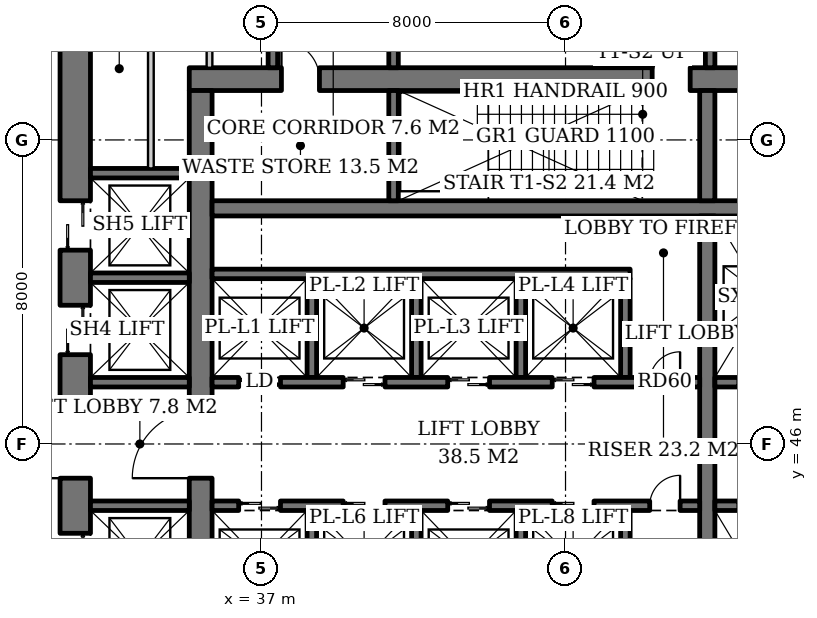
"""IFC4 building model, lengths in metres.
Left out: names, types, materials, properties, quantities, classifications, styles, units other than length and angle.
Written with IfcOpenShell. Run it as: python <this file> out.ifc"""

import sys

from ifc_helpers import new_model, si_unit, direction, frame, frame_2d, origin, place, context, subcontext, project, spatial, rectangle, extrude, element, fill, save


model = new_model("IFC4")
c1 = context("Model", 3, precision=1e-05, world=origin(), true_north=direction((0.0, 1.0)))
c2 = subcontext(c1, "Body", "Model", "MODEL_VIEW")
j1 = project(units=[si_unit("LENGTHUNIT", "METRE"), si_unit("PLANEANGLEUNIT", "RADIAN")], contexts=[c1])
p1 = place(None, origin())
s1 = spatial("IfcSite", under=j1, at=p1, CompositionType="ELEMENT")
p2 = place(p1, origin())
s2 = spatial("IfcBuilding", under=s1, at=p2, CompositionType="ELEMENT")
p3 = place(p2, frame((0.0, 0.0, 6.0)))
s3 = spatial("IfcBuildingStorey", under=s2, at=p3, CompositionType="ELEMENT", Elevation=6.0)
p4 = place(p3, frame((35.1, 55.6, 0.0), z_axis=(0.0, 0.0, 1.0), x_axis=(1.0, 0.0, 0.0)))
e1 = element("IfcWall", 1, at=p4, inside=s3, PredefinedType="SHEAR", context=c2, shape_type="SweptSolid", body=[
    extrude(rectangle(XDim=19.8, YDim=0.6, at=frame_2d((9.9, 0.0))), origin(), (0.0, 0.0, 1.0), 5.0),
])
p5 = place(p4, frame((14.54, 0.0, 0.0)))
e2 = element("IfcOpeningElement", 2, at=p5, cuts=e1, PredefinedType="OPENING", context=c2, shape_type="SweptSolid", body=[
    extrude(rectangle(XDim=1.0, YDim=2.1, at=frame_2d((0.5, 1.05))), frame((0.0, 0.31, 0.0), z_axis=(0.0, -1.0, 0.0), x_axis=(1.0, 0.0, 0.0)), (0.0, 0.0, 1.0), 0.62),
])
p6 = place(p4, frame((12.18, 0.0, 0.0)))
e3 = element("IfcOpeningElement", 3, at=p6, cuts=e1, PredefinedType="OPENING", context=c2, shape_type="SweptSolid", body=[
    extrude(rectangle(XDim=1.0, YDim=2.1, at=frame_2d((0.5, 1.05))), frame((0.0, 0.31, 0.0), z_axis=(0.0, -1.0, 0.0), x_axis=(1.0, 0.0, 0.0)), (0.0, 0.0, 1.0), 0.62),
])
p7 = place(p4, frame((2.425, 0.0, 0.0)))
e4 = element("IfcOpeningElement", 4, at=p7, cuts=e1, PredefinedType="OPENING", context=c2, shape_type="SweptSolid", body=[
    extrude(rectangle(XDim=1.0, YDim=2.1, at=frame_2d((0.5, 1.05))), frame((0.0, 0.31, 0.0), z_axis=(0.0, -1.0, 0.0), x_axis=(1.0, 0.0, 0.0)), (0.0, 0.0, 1.0), 0.62),
])
p8 = place(p3, frame((35.4, 36.7, 0.0), z_axis=(0.0, 0.0, 1.0), x_axis=(0.0, 1.0, 0.0)))
e5 = element("IfcWall", 5, at=p8, inside=s3, PredefinedType="SHEAR", context=c2, shape_type="SweptSolid", body=[
    extrude(rectangle(XDim=18.6, YDim=0.6, at=frame_2d((9.3, 0.0))), origin(), (0.0, 0.0, 1.0), 5.0),
])
p9 = place(p8, frame((8.4, 0.0, 0.0)))
e6 = element("IfcOpeningElement", 6, at=p9, cuts=e5, PredefinedType="OPENING", context=c2, shape_type="SweptSolid", body=[
    extrude(rectangle(XDim=1.8, YDim=2.4, at=frame_2d((0.9, 1.2))), frame((0.0, 0.31, 0.0), z_axis=(0.0, -1.0, 0.0), x_axis=(1.0, 0.0, 0.0)), (0.0, 0.0, 1.0), 0.62),
])
p10 = place(p3, frame((32.1, 33.5, 0.0), z_axis=(0.0, 0.0, 1.0), x_axis=(0.0, 1.0, 0.0)))
e7 = element("IfcWall", 7, at=p10, inside=s3, PredefinedType="SHEAR", context=c2, shape_type="SweptSolid", body=[
    extrude(rectangle(XDim=25.0, YDim=0.8, at=frame_2d((12.5, 0.0))), origin(), (0.0, 0.0, 1.0), 5.0),
])
p11 = place(p10, frame((3.35, 0.0, 0.0)))
e8 = element("IfcOpeningElement", 8, at=p11, cuts=e7, PredefinedType="OPENING", context=c2, shape_type="SweptSolid", body=[
    extrude(rectangle(XDim=1.3, YDim=2.2, at=frame_2d((0.65, 1.1))), frame((0.0, 0.41, 0.0), z_axis=(0.0, -1.0, 0.0), x_axis=(1.0, 0.0, 0.0)), (0.0, 0.0, 1.0), 0.82),
])
p12 = place(p10, frame((6.1, 0.0, 0.0)))
e9 = element("IfcOpeningElement", 9, at=p12, cuts=e7, PredefinedType="OPENING", context=c2, shape_type="SweptSolid", body=[
    extrude(rectangle(XDim=1.3, YDim=2.2, at=frame_2d((0.65, 1.1))), frame((0.0, 0.41, 0.0), z_axis=(0.0, -1.0, 0.0), x_axis=(1.0, 0.0, 0.0)), (0.0, 0.0, 1.0), 0.82),
])
p13 = place(p10, frame((8.85, 0.0, 0.0)))
e10 = element("IfcOpeningElement", 10, at=p13, cuts=e7, PredefinedType="OPENING", context=c2, shape_type="SweptSolid", body=[
    extrude(rectangle(XDim=1.3, YDim=2.2, at=frame_2d((0.65, 1.1))), frame((0.0, 0.41, 0.0), z_axis=(0.0, -1.0, 0.0), x_axis=(1.0, 0.0, 0.0)), (0.0, 0.0, 1.0), 0.82),
])
p14 = place(p10, frame((14.85, 0.0, 0.0)))
e11 = element("IfcOpeningElement", 11, at=p14, cuts=e7, PredefinedType="OPENING", context=c2, shape_type="SweptSolid", body=[
    extrude(rectangle(XDim=1.3, YDim=2.2, at=frame_2d((0.65, 1.1))), frame((0.0, 0.41, 0.0), z_axis=(0.0, -1.0, 0.0), x_axis=(1.0, 0.0, 0.0)), (0.0, 0.0, 1.0), 0.82),
])
p15 = place(p10, frame((17.6, 0.0, 0.0)))
e12 = element("IfcOpeningElement", 12, at=p15, cuts=e7, PredefinedType="OPENING", context=c2, shape_type="SweptSolid", body=[
    extrude(rectangle(XDim=1.3, YDim=2.2, at=frame_2d((0.65, 1.1))), frame((0.0, 0.41, 0.0), z_axis=(0.0, -1.0, 0.0), x_axis=(1.0, 0.0, 0.0)), (0.0, 0.0, 1.0), 0.82),
])
p16 = place(p10, frame((11.6, 0.0, 0.0)))
e13 = element("IfcOpeningElement", 13, at=p16, cuts=e7, PredefinedType="OPENING", context=c2, shape_type="SweptSolid", body=[
    extrude(rectangle(XDim=1.8, YDim=2.4, at=frame_2d((0.9, 1.2))), frame((0.0, 0.41, 0.0), z_axis=(0.0, -1.0, 0.0), x_axis=(1.0, 0.0, 0.0)), (0.0, 0.0, 1.0), 0.82),
])
p17 = place(p3, frame((35.7, 52.2, 0.0), z_axis=(0.0, 0.0, 1.0), x_axis=(1.0, 0.0, 0.0)))
e14 = element("IfcWall", 14, at=p17, inside=s3, PredefinedType="SHEAR", context=c2, shape_type="SweptSolid", body=[
    extrude(rectangle(XDim=18.6, YDim=0.4, at=frame_2d((9.3, 0.0))), origin(), (0.0, 0.0, 1.0), 5.0),
])
p18 = place(p3, frame((48.73, 40.0, 0.0), z_axis=(0.0, 0.0, 1.0), x_axis=(0.0, 1.0, 0.0)))
e15 = element("IfcWall", 15, at=p18, inside=s3, PredefinedType="SHEAR", context=c2, shape_type="SweptSolid", body=[
    extrude(rectangle(XDim=12.0, YDim=0.4, at=frame_2d((6.0, 0.0))), origin(), (0.0, 0.0, 1.0), 5.0),
])
p19 = place(p3, frame((48.73, 52.4, 0.0), z_axis=(0.0, 0.0, 1.0), x_axis=(0.0, 1.0, 0.0)))
e16 = element("IfcWall", 16, at=p19, inside=s3, PredefinedType="SHEAR", context=c2, shape_type="SweptSolid", body=[
    extrude(rectangle(XDim=2.9, YDim=0.4, at=frame_2d((1.45, 0.0))), origin(), (0.0, 0.0, 1.0), 5.0),
])
p20 = place(p3, frame((40.475, 52.4, 0.0), z_axis=(0.0, 0.0, 1.0), x_axis=(0.0, 1.0, 0.0)))
e17 = element("IfcWall", 17, at=p20, inside=s3, PredefinedType="SHEAR", context=c2, shape_type="SweptSolid", body=[
    extrude(rectangle(XDim=2.9, YDim=0.25, at=frame_2d((1.45, 0.0))), origin(), (0.0, 0.0, 1.0), 5.0),
])
for number, where, z_axis, x_axis in (
    (18, (38.325, 47.75, 0.0), (0.0, 0.0, 1.0), (0.0, 1.0, 0.0)),
    (19, (41.075, 47.75, 0.0), (0.0, 0.0, 1.0), (0.0, 1.0, 0.0)),
    (20, (43.825, 47.75, 0.0), (0.0, 0.0, 1.0), (0.0, 1.0, 0.0)),
    (21, (46.575, 47.75, 0.0), (0.0, 0.0, 1.0), (0.0, 1.0, 0.0)),
):
    element("IfcWall", number, at=place(p3, frame(where, z_axis=z_axis, x_axis=x_axis)), inside=s3, PredefinedType="SHEAR", context=c2, shape_type="SweptSolid", body=[
        extrude(rectangle(XDim=2.6, YDim=0.25, at=frame_2d((1.3, 0.0))), origin(), (0.0, 0.0, 1.0), 5.0),
    ])
p21 = place(p3, frame((35.7, 50.475, 0.0), z_axis=(0.0, 0.0, 1.0), x_axis=(1.0, 0.0, 0.0)))
e22 = element("IfcWall", 22, at=p21, inside=s3, PredefinedType="SHEAR", context=c2, shape_type="SweptSolid", body=[
    extrude(rectangle(XDim=11.0, YDim=0.25, at=frame_2d((5.5, 0.0))), origin(), (0.0, 0.0, 1.0), 5.0),
])
p22 = place(p3, frame((35.7, 47.625, 0.0), z_axis=(0.0, 0.0, 1.0), x_axis=(1.0, 0.0, 0.0)))
e23 = element("IfcWall", 23, at=p22, inside=s3, PredefinedType="SHEAR", context=c2, shape_type="SweptSolid", body=[
    extrude(rectangle(XDim=12.83, YDim=0.25, at=frame_2d((6.415, 0.0))), origin(), (0.0, 0.0, 1.0), 5.0),
])
p23 = place(p22, frame((0.7, 0.0, 0.0)))
e24 = element("IfcOpeningElement", 24, at=p23, cuts=e23, PredefinedType="OPENING", context=c2, shape_type="SweptSolid", body=[
    extrude(rectangle(XDim=1.1, YDim=2.2, at=frame_2d((0.55, 1.1))), frame((0.0, 0.135, 0.0), z_axis=(0.0, -1.0, 0.0), x_axis=(1.0, 0.0, 0.0)), (0.0, 0.0, 1.0), 0.27),
])
p24 = place(p22, frame((3.45, 0.0, 0.0)))
e25 = element("IfcOpeningElement", 25, at=p24, cuts=e23, PredefinedType="OPENING", context=c2, shape_type="SweptSolid", body=[
    extrude(rectangle(XDim=1.1, YDim=2.2, at=frame_2d((0.55, 1.1))), frame((0.0, 0.135, 0.0), z_axis=(0.0, -1.0, 0.0), x_axis=(1.0, 0.0, 0.0)), (0.0, 0.0, 1.0), 0.27),
])
p25 = place(p22, frame((6.2, 0.0, 0.0)))
e26 = element("IfcOpeningElement", 26, at=p25, cuts=e23, PredefinedType="OPENING", context=c2, shape_type="SweptSolid", body=[
    extrude(rectangle(XDim=1.1, YDim=2.2, at=frame_2d((0.55, 1.1))), frame((0.0, 0.135, 0.0), z_axis=(0.0, -1.0, 0.0), x_axis=(1.0, 0.0, 0.0)), (0.0, 0.0, 1.0), 0.27),
])
p26 = place(p22, frame((8.95, 0.0, 0.0)))
e27 = element("IfcOpeningElement", 27, at=p26, cuts=e23, PredefinedType="OPENING", context=c2, shape_type="SweptSolid", body=[
    extrude(rectangle(XDim=1.1, YDim=2.2, at=frame_2d((0.55, 1.1))), frame((0.0, 0.135, 0.0), z_axis=(0.0, -1.0, 0.0), x_axis=(1.0, 0.0, 0.0)), (0.0, 0.0, 1.0), 0.27),
])
p27 = place(p22, frame((11.515, 0.0, 0.0)))
e28 = element("IfcOpeningElement", 28, at=p27, cuts=e23, PredefinedType="OPENING", context=c2, shape_type="SweptSolid", body=[
    extrude(rectangle(XDim=0.8, YDim=2.0, at=frame_2d((0.4, 1.0))), frame((0.0, 0.135, 0.0), z_axis=(0.0, -1.0, 0.0), x_axis=(1.0, 0.0, 0.0)), (0.0, 0.0, 1.0), 0.27),
])
for number, where, z_axis, x_axis in (
    (29, (38.325, 44.25, 0.0), (0.0, 0.0, 1.0), (0.0, -1.0, 0.0)),
    (30, (41.075, 44.25, 0.0), (0.0, 0.0, 1.0), (0.0, -1.0, 0.0)),
    (31, (43.825, 44.25, 0.0), (0.0, 0.0, 1.0), (0.0, -1.0, 0.0)),
    (32, (46.575, 44.25, 0.0), (0.0, 0.0, 1.0), (0.0, -1.0, 0.0)),
):
    element("IfcWall", number, at=place(p3, frame(where, z_axis=z_axis, x_axis=x_axis)), inside=s3, PredefinedType="SHEAR", context=c2, shape_type="SweptSolid", body=[
        extrude(rectangle(XDim=2.6, YDim=0.25, at=frame_2d((1.3, 0.0))), origin(), (0.0, 0.0, 1.0), 5.0),
    ])
p28 = place(p3, frame((35.7, 44.375, 0.0), z_axis=(0.0, 0.0, 1.0), x_axis=(1.0, 0.0, 0.0)))
e33 = element("IfcWall", 33, at=p28, inside=s3, PredefinedType="SHEAR", context=c2, shape_type="SweptSolid", body=[
    extrude(rectangle(XDim=12.83, YDim=0.25, at=frame_2d((6.415, 0.0))), origin(), (0.0, 0.0, 1.0), 5.0),
])
p29 = place(p28, frame((0.7, 0.0, 0.0)))
e34 = element("IfcOpeningElement", 34, at=p29, cuts=e33, PredefinedType="OPENING", context=c2, shape_type="SweptSolid", body=[
    extrude(rectangle(XDim=1.1, YDim=2.2, at=frame_2d((0.55, 1.1))), frame((0.0, 0.135, 0.0), z_axis=(0.0, -1.0, 0.0), x_axis=(1.0, 0.0, 0.0)), (0.0, 0.0, 1.0), 0.27),
])
p30 = place(p28, frame((3.45, 0.0, 0.0)))
e35 = element("IfcOpeningElement", 35, at=p30, cuts=e33, PredefinedType="OPENING", context=c2, shape_type="SweptSolid", body=[
    extrude(rectangle(XDim=1.1, YDim=2.2, at=frame_2d((0.55, 1.1))), frame((0.0, 0.135, 0.0), z_axis=(0.0, -1.0, 0.0), x_axis=(1.0, 0.0, 0.0)), (0.0, 0.0, 1.0), 0.27),
])
p31 = place(p28, frame((6.2, 0.0, 0.0)))
e36 = element("IfcOpeningElement", 36, at=p31, cuts=e33, PredefinedType="OPENING", context=c2, shape_type="SweptSolid", body=[
    extrude(rectangle(XDim=1.1, YDim=2.2, at=frame_2d((0.55, 1.1))), frame((0.0, 0.135, 0.0), z_axis=(0.0, -1.0, 0.0), x_axis=(1.0, 0.0, 0.0)), (0.0, 0.0, 1.0), 0.27),
])
p32 = place(p28, frame((8.95, 0.0, 0.0)))
e37 = element("IfcOpeningElement", 37, at=p32, cuts=e33, PredefinedType="OPENING", context=c2, shape_type="SweptSolid", body=[
    extrude(rectangle(XDim=1.1, YDim=2.2, at=frame_2d((0.55, 1.1))), frame((0.0, 0.135, 0.0), z_axis=(0.0, -1.0, 0.0), x_axis=(1.0, 0.0, 0.0)), (0.0, 0.0, 1.0), 0.27),
])
p33 = place(p28, frame((11.515, 0.0, 0.0)))
e38 = element("IfcOpeningElement", 38, at=p33, cuts=e33, PredefinedType="OPENING", context=c2, shape_type="SweptSolid", body=[
    extrude(rectangle(XDim=0.8, YDim=2.0, at=frame_2d((0.4, 1.0))), frame((0.0, 0.135, 0.0), z_axis=(0.0, -1.0, 0.0), x_axis=(1.0, 0.0, 0.0)), (0.0, 0.0, 1.0), 0.27),
])
p34 = place(p3, frame((48.93, 47.625, 0.0), z_axis=(0.0, 0.0, 1.0), x_axis=(1.0, 0.0, 0.0)))
e39 = element("IfcWall", 39, at=p34, inside=s3, PredefinedType="SHEAR", context=c2, shape_type="SweptSolid", body=[
    extrude(rectangle(XDim=5.37, YDim=0.25, at=frame_2d((2.685, 0.0))), origin(), (0.0, 0.0, 1.0), 5.0),
])
p35 = place(p34, frame((0.63, 0.0, 0.0)))
e40 = element("IfcOpeningElement", 40, at=p35, cuts=e39, PredefinedType="OPENING", context=c2, shape_type="SweptSolid", body=[
    extrude(rectangle(XDim=1.3, YDim=2.2, at=frame_2d((0.65, 1.1))), frame((0.0, 0.135, 0.0), z_axis=(0.0, -1.0, 0.0), x_axis=(1.0, 0.0, 0.0)), (0.0, 0.0, 1.0), 0.27),
])
p36 = place(p34, frame((3.44, 0.0, 0.0)))
e41 = element("IfcOpeningElement", 41, at=p36, cuts=e39, PredefinedType="OPENING", context=c2, shape_type="SweptSolid", body=[
    extrude(rectangle(XDim=1.3, YDim=2.2, at=frame_2d((0.65, 1.1))), frame((0.0, 0.135, 0.0), z_axis=(0.0, -1.0, 0.0), x_axis=(1.0, 0.0, 0.0)), (0.0, 0.0, 1.0), 0.27),
])
p37 = place(p3, frame((48.93, 44.375, 0.0), z_axis=(0.0, 0.0, 1.0), x_axis=(1.0, 0.0, 0.0)))
e42 = element("IfcWall", 42, at=p37, inside=s3, PredefinedType="SHEAR", context=c2, shape_type="SweptSolid", body=[
    extrude(rectangle(XDim=5.37, YDim=0.25, at=frame_2d((2.685, 0.0))), origin(), (0.0, 0.0, 1.0), 5.0),
])
p38 = place(p37, frame((0.63, 0.0, 0.0)))
e43 = element("IfcOpeningElement", 43, at=p38, cuts=e42, PredefinedType="OPENING", context=c2, shape_type="SweptSolid", body=[
    extrude(rectangle(XDim=1.3, YDim=2.2, at=frame_2d((0.65, 1.1))), frame((0.0, 0.135, 0.0), z_axis=(0.0, -1.0, 0.0), x_axis=(1.0, 0.0, 0.0)), (0.0, 0.0, 1.0), 0.27),
])
p39 = place(p37, frame((3.44, 0.0, 0.0)))
e44 = element("IfcOpeningElement", 44, at=p39, cuts=e42, PredefinedType="OPENING", context=c2, shape_type="SweptSolid", body=[
    extrude(rectangle(XDim=1.3, YDim=2.2, at=frame_2d((0.65, 1.1))), frame((0.0, 0.135, 0.0), z_axis=(0.0, -1.0, 0.0), x_axis=(1.0, 0.0, 0.0)), (0.0, 0.0, 1.0), 0.27),
])
for number, where, z_axis, x_axis in (
    (45, (32.5, 44.375, 0.0), (0.0, 0.0, 1.0), (1.0, 0.0, 0.0)),
    (46, (32.5, 47.625, 0.0), (0.0, 0.0, 1.0), (1.0, 0.0, 0.0)),
    (47, (32.5, 50.375, 0.0), (0.0, 0.0, 1.0), (1.0, 0.0, 0.0)),
    (48, (32.5, 53.125, 0.0), (0.0, 0.0, 1.0), (1.0, 0.0, 0.0)),
):
    element("IfcWall", number, at=place(p3, frame(where, z_axis=z_axis, x_axis=x_axis)), inside=s3, PredefinedType="SHEAR", context=c2, shape_type="SweptSolid", body=[
        extrude(rectangle(XDim=2.6, YDim=0.25, at=frame_2d((1.3, 0.0))), origin(), (0.0, 0.0, 1.0), 5.0),
    ])
for number, where, z_axis, x_axis in (
    (49, (48.805, 55.9, 0.0), (0.0, 0.0, 1.0), (0.0, 1.0, 0.0)),
    (50, (40.475, 55.9, 0.0), (0.0, 0.0, 1.0), (0.0, 1.0, 0.0)),
    (51, (37.3, 55.9, 0.0), (0.0, 0.0, 1.0), (0.0, 1.0, 0.0)),
):
    element("IfcWall", number, at=place(p3, frame(where, z_axis=z_axis, x_axis=x_axis)), inside=s3, PredefinedType="SOLIDWALL", context=c2, shape_type="SweptSolid", body=[
        extrude(rectangle(XDim=2.6, YDim=0.25, at=frame_2d((1.3, 0.0))), origin(), (0.0, 0.0, 1.0), 4.7),
    ])
p40 = place(p3, frame((34.09, 53.25, 0.0), z_axis=(0.0, 0.0, 1.0), x_axis=(0.0, 1.0, 0.0)))
e52 = element("IfcWall", 52, at=p40, inside=s3, PredefinedType="SOLIDWALL", context=c2, shape_type="SweptSolid", body=[
    extrude(rectangle(XDim=5.25, YDim=0.15, at=frame_2d((2.625, 0.0))), origin(), (0.0, 0.0, 1.0), 4.7),
])
p41 = place(p3, frame((35.632, 55.9, 0.0), z_axis=(0.0, 0.0, 1.0), x_axis=(0.0, 1.0, 0.0)))
e53 = element("IfcWall", 53, at=p41, inside=s3, PredefinedType="SOLIDWALL", context=c2, shape_type="SweptSolid", body=[
    extrude(rectangle(XDim=2.6, YDim=0.15, at=frame_2d((1.3, 0.0))), origin(), (0.0, 0.0, 1.0), 4.7),
])
p42 = place(p23, origin())
e54 = element("IfcDoor", 54, at=p42, inside=s3, OperationType="DOUBLE_DOOR_SLIDING", PredefinedType="DOOR", context=c2, shape_type="SweptSolid", body=[
    extrude(rectangle(XDim=1.1, YDim=2.2, at=frame_2d((0.55, 1.1))), frame((0.0, 0.025, 0.0), z_axis=(0.0, -1.0, 0.0), x_axis=(1.0, 0.0, 0.0)), (0.0, 0.0, 1.0), 0.05),
])
fill(e24, e54)
p43 = place(p24, origin())
e55 = element("IfcDoor", 55, at=p43, inside=s3, OperationType="DOUBLE_DOOR_SLIDING", PredefinedType="DOOR", context=c2, shape_type="SweptSolid", body=[
    extrude(rectangle(XDim=1.1, YDim=2.2, at=frame_2d((0.55, 1.1))), frame((0.0, 0.025, 0.0), z_axis=(0.0, -1.0, 0.0), x_axis=(1.0, 0.0, 0.0)), (0.0, 0.0, 1.0), 0.05),
])
fill(e25, e55)
p44 = place(p25, origin())
e56 = element("IfcDoor", 56, at=p44, inside=s3, OperationType="DOUBLE_DOOR_SLIDING", PredefinedType="DOOR", context=c2, shape_type="SweptSolid", body=[
    extrude(rectangle(XDim=1.1, YDim=2.2, at=frame_2d((0.55, 1.1))), frame((0.0, 0.025, 0.0), z_axis=(0.0, -1.0, 0.0), x_axis=(1.0, 0.0, 0.0)), (0.0, 0.0, 1.0), 0.05),
])
fill(e26, e56)
p45 = place(p26, origin())
e57 = element("IfcDoor", 57, at=p45, inside=s3, OperationType="DOUBLE_DOOR_SLIDING", PredefinedType="DOOR", context=c2, shape_type="SweptSolid", body=[
    extrude(rectangle(XDim=1.1, YDim=2.2, at=frame_2d((0.55, 1.1))), frame((0.0, 0.025, 0.0), z_axis=(0.0, -1.0, 0.0), x_axis=(1.0, 0.0, 0.0)), (0.0, 0.0, 1.0), 0.05),
])
fill(e27, e57)
p46 = place(p27, origin())
e58 = element("IfcDoor", 58, at=p46, inside=s3, OperationType="SINGLE_SWING_RIGHT", PredefinedType="DOOR", context=c2, shape_type="SweptSolid", body=[
    extrude(rectangle(XDim=0.8, YDim=2.0, at=frame_2d((0.4, 1.0))), frame((0.0, 0.025, 0.0), z_axis=(0.0, -1.0, 0.0), x_axis=(1.0, 0.0, 0.0)), (0.0, 0.0, 1.0), 0.05),
])
fill(e28, e58)
p47 = place(p29, origin())
e59 = element("IfcDoor", 59, at=p47, inside=s3, OperationType="DOUBLE_DOOR_SLIDING", PredefinedType="DOOR", context=c2, shape_type="SweptSolid", body=[
    extrude(rectangle(XDim=1.1, YDim=2.2, at=frame_2d((0.55, 1.1))), frame((0.0, 0.025, 0.0), z_axis=(0.0, -1.0, 0.0), x_axis=(1.0, 0.0, 0.0)), (0.0, 0.0, 1.0), 0.05),
])
fill(e34, e59)
p48 = place(p30, origin())
e60 = element("IfcDoor", 60, at=p48, inside=s3, OperationType="DOUBLE_DOOR_SLIDING", PredefinedType="DOOR", context=c2, shape_type="SweptSolid", body=[
    extrude(rectangle(XDim=1.1, YDim=2.2, at=frame_2d((0.55, 1.1))), frame((0.0, 0.025, 0.0), z_axis=(0.0, -1.0, 0.0), x_axis=(1.0, 0.0, 0.0)), (0.0, 0.0, 1.0), 0.05),
])
fill(e35, e60)
p49 = place(p31, origin())
e61 = element("IfcDoor", 61, at=p49, inside=s3, OperationType="DOUBLE_DOOR_SLIDING", PredefinedType="DOOR", context=c2, shape_type="SweptSolid", body=[
    extrude(rectangle(XDim=1.1, YDim=2.2, at=frame_2d((0.55, 1.1))), frame((0.0, 0.025, 0.0), z_axis=(0.0, -1.0, 0.0), x_axis=(1.0, 0.0, 0.0)), (0.0, 0.0, 1.0), 0.05),
])
fill(e36, e61)
p50 = place(p32, origin())
e62 = element("IfcDoor", 62, at=p50, inside=s3, OperationType="DOUBLE_DOOR_SLIDING", PredefinedType="DOOR", context=c2, shape_type="SweptSolid", body=[
    extrude(rectangle(XDim=1.1, YDim=2.2, at=frame_2d((0.55, 1.1))), frame((0.0, 0.025, 0.0), z_axis=(0.0, -1.0, 0.0), x_axis=(1.0, 0.0, 0.0)), (0.0, 0.0, 1.0), 0.05),
])
fill(e37, e62)
p51 = place(p33, origin())
e63 = element("IfcDoor", 63, at=p51, inside=s3, OperationType="SINGLE_SWING_RIGHT", PredefinedType="DOOR", context=c2, shape_type="SweptSolid", body=[
    extrude(rectangle(XDim=0.8, YDim=2.0, at=frame_2d((0.4, 1.0))), frame((0.0, 0.025, 0.0), z_axis=(0.0, -1.0, 0.0), x_axis=(1.0, 0.0, 0.0)), (0.0, 0.0, 1.0), 0.05),
])
fill(e38, e63)
p52 = place(p9, origin())
e64 = element("IfcDoor", 64, at=p52, inside=s3, OperationType="DOUBLE_DOOR_SINGLE_SWING", PredefinedType="DOOR", context=c2, shape_type="SweptSolid", body=[
    extrude(rectangle(XDim=1.8, YDim=2.4, at=frame_2d((0.9, 1.2))), frame((0.0, 0.025, 0.0), z_axis=(0.0, -1.0, 0.0), x_axis=(1.0, 0.0, 0.0)), (0.0, 0.0, 1.0), 0.05),
])
fill(e6, e64)
p53 = place(p6, origin())
e65 = element("IfcDoor", 65, at=p53, inside=s3, OperationType="SINGLE_SWING_RIGHT", PredefinedType="DOOR", context=c2, shape_type="SweptSolid", body=[
    extrude(rectangle(XDim=1.0, YDim=2.1, at=frame_2d((0.5, 1.05))), frame((0.0, 0.025, 0.0), z_axis=(0.0, -1.0, 0.0), x_axis=(1.0, 0.0, 0.0)), (0.0, 0.0, 1.0), 0.05),
])
fill(e3, e65)
p54 = place(p13, origin())
e66 = element("IfcDoor", 66, at=p54, inside=s3, OperationType="DOUBLE_DOOR_SLIDING", PredefinedType="DOOR", context=c2, shape_type="SweptSolid", body=[
    extrude(rectangle(XDim=1.3, YDim=2.2, at=frame_2d((0.65, 1.1))), frame((0.0, 0.025, 0.0), z_axis=(0.0, -1.0, 0.0), x_axis=(1.0, 0.0, 0.0)), (0.0, 0.0, 1.0), 0.05),
])
fill(e10, e66)
p55 = place(p14, origin())
e67 = element("IfcDoor", 67, at=p55, inside=s3, OperationType="DOUBLE_DOOR_SLIDING", PredefinedType="DOOR", context=c2, shape_type="SweptSolid", body=[
    extrude(rectangle(XDim=1.3, YDim=2.2, at=frame_2d((0.65, 1.1))), frame((0.0, 0.025, 0.0), z_axis=(0.0, -1.0, 0.0), x_axis=(1.0, 0.0, 0.0)), (0.0, 0.0, 1.0), 0.05),
])
fill(e11, e67)
p56 = place(p15, origin())
e68 = element("IfcDoor", 68, at=p56, inside=s3, OperationType="DOUBLE_DOOR_SLIDING", PredefinedType="DOOR", context=c2, shape_type="SweptSolid", body=[
    extrude(rectangle(XDim=1.3, YDim=2.2, at=frame_2d((0.65, 1.1))), frame((0.0, 0.025, 0.0), z_axis=(0.0, -1.0, 0.0), x_axis=(1.0, 0.0, 0.0)), (0.0, 0.0, 1.0), 0.05),
])
fill(e12, e68)
p57 = place(p16, origin())
e69 = element("IfcDoor", 69, at=p57, inside=s3, OperationType="DOUBLE_DOOR_SINGLE_SWING", PredefinedType="DOOR", context=c2, shape_type="SweptSolid", body=[
    extrude(rectangle(XDim=1.8, YDim=2.4, at=frame_2d((0.9, 1.2))), frame((0.0, 0.025, 0.0), z_axis=(0.0, -1.0, 0.0), x_axis=(1.0, 0.0, 0.0)), (0.0, 0.0, 1.0), 0.05),
])
fill(e13, e69)
p58 = place(p7, origin())
e70 = element("IfcDoor", 70, at=p58, inside=s3, OperationType="SINGLE_SWING_LEFT", PredefinedType="DOOR", context=c2, shape_type="SweptSolid", body=[
    extrude(rectangle(XDim=1.0, YDim=2.1, at=frame_2d((0.5, 1.05))), frame((0.0, -0.24, 0.0), z_axis=(0.0, -1.0, 0.0), x_axis=(1.0, 0.0, 0.0)), (0.0, 0.0, 1.0), 0.05),
])
fill(e4, e70)
save(model, sys.argv[1])
